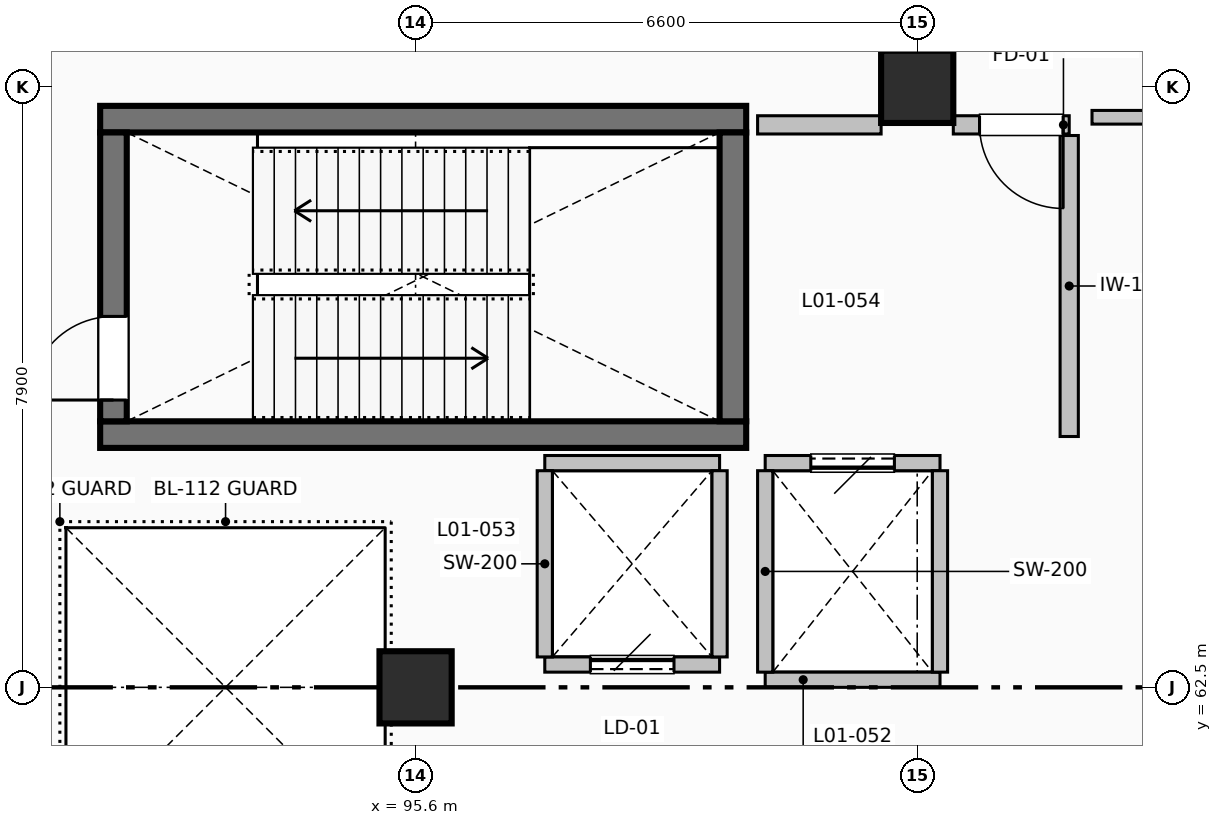
"""IFC4 building model, lengths in metres.
Left out: names, types, materials, properties, quantities, classifications, styles, units other than length and angle.
Written with IfcOpenShell. Run it as: python <this file> out.ifc"""

import sys

from ifc_helpers import new_model, si_unit, direction, frame, frame_2d, origin, origin_2d, place, context, subcontext, project, spatial, rectangle, extrude, element, fill, save


model = new_model("IFC4")
c1 = context("Model", 3, precision=1e-05, world=origin(), true_north=direction((0.0, 1.0)))
c2 = subcontext(c1, "Body", "Model", "MODEL_VIEW")
j1 = project(units=[si_unit("LENGTHUNIT", "METRE"), si_unit("PLANEANGLEUNIT", "RADIAN")], contexts=[c1])
p1 = place(None, origin())
s1 = spatial("IfcSite", under=j1, at=p1, CompositionType="ELEMENT")
p2 = place(p1, origin())
s2 = spatial("IfcBuilding", under=s1, at=p2, CompositionType="ELEMENT")
p3 = place(p2, frame((0.0, 0.0, 5.4)))
s3 = spatial("IfcBuildingStorey", under=s2, at=p3, CompositionType="ELEMENT", Elevation=5.4)
for number, where, z_axis, x_axis in (
    (1, (95.6, 62.5, 0.0), (0.0, 0.0, 1.0), (1.0, 0.0, 0.0)),
    (2, (102.2, 70.4, 0.0), (0.0, 0.0, 1.0), (1.0, 0.0, 0.0)),
):
    element("IfcColumn", number, at=place(p3, frame(where, z_axis=z_axis, x_axis=x_axis)), inside=s3, PredefinedType="COLUMN", context=c2, shape_type="SweptSolid", body=[
        extrude(rectangle(XDim=0.95, YDim=0.95, at=origin_2d()), origin(), (0.0, 0.0, 1.0), 4.8),
    ])
for number, where, z_axis, x_axis in (
    (3, (91.45, 65.825, 0.0), (0.0, 0.0, 1.0), (1.0, 0.0, 0.0)),
    (4, (99.95, 69.975, 0.0), (0.0, 0.0, 1.0), (-1.0, 0.0, 0.0)),
):
    element("IfcWall", number, at=place(p3, frame(where, z_axis=z_axis, x_axis=x_axis)), inside=s3, PredefinedType="SHEAR", context=c2, shape_type="SweptSolid", body=[
        extrude(rectangle(XDim=8.5, YDim=0.35, at=frame_2d((4.25, 0.0))), origin(), (0.0, 0.0, 1.0), 4.48),
    ])
p4 = place(p3, frame((91.625, 66.0, 0.0), z_axis=(0.0, 0.0, 1.0), x_axis=(0.0, 1.0, 0.0)))
e5 = element("IfcWall", 5, at=p4, inside=s3, PredefinedType="SHEAR", context=c2, shape_type="SweptSolid", body=[
    extrude(rectangle(XDim=3.8, YDim=0.35, at=frame_2d((1.9, 0.0))), origin(), (0.0, 0.0, 1.0), 4.48),
])
p5 = place(p4, frame((0.28, 0.0, 0.0)))
e6 = element("IfcOpeningElement", 6, at=p5, cuts=e5, PredefinedType="OPENING", context=c2, shape_type="SweptSolid", body=[
    extrude(rectangle(XDim=1.1, YDim=2.08, at=frame_2d((0.55, 1.04))), frame((0.0, 0.185, 0.0), z_axis=(0.0, -1.0, 0.0), x_axis=(1.0, 0.0, 0.0)), (0.0, 0.0, 1.0), 0.37),
])
p6 = place(p3, frame((99.775, 69.8, 0.0), z_axis=(0.0, 0.0, 1.0), x_axis=(0.0, -1.0, 0.0)))
e7 = element("IfcWall", 7, at=p6, inside=s3, PredefinedType="SHEAR", context=c2, shape_type="SweptSolid", body=[
    extrude(rectangle(XDim=3.8, YDim=0.35, at=frame_2d((1.9, 0.0))), origin(), (0.0, 0.0, 1.0), 4.48),
])
p7 = place(p3, frame((100.2, 62.6, 0.0), z_axis=(0.0, 0.0, 1.0), x_axis=(1.0, 0.0, 0.0)))
e8 = element("IfcWall", 8, at=p7, inside=s3, PredefinedType="PARTITIONING", context=c2, shape_type="SweptSolid", body=[
    extrude(rectangle(XDim=2.3, YDim=0.2, at=frame_2d((1.15, 0.0))), origin(), (0.0, 0.0, 1.0), 4.472),
])
p8 = place(p3, frame((102.5, 65.45, 0.0), z_axis=(0.0, 0.0, 1.0), x_axis=(-1.0, 0.0, 0.0)))
e9 = element("IfcWall", 9, at=p8, inside=s3, PredefinedType="PARTITIONING", context=c2, shape_type="SweptSolid", body=[
    extrude(rectangle(XDim=2.3, YDim=0.2, at=frame_2d((1.15, 0.0))), origin(), (0.0, 0.0, 1.0), 4.472),
])
p9 = place(p8, frame((0.6, 0.0, 0.0)))
e10 = element("IfcOpeningElement", 10, at=p9, cuts=e9, PredefinedType="OPENING", context=c2, shape_type="SweptSolid", body=[
    extrude(rectangle(XDim=1.1, YDim=2.15, at=frame_2d((0.55, 1.075))), frame((0.0, 0.11, 0.0), z_axis=(0.0, -1.0, 0.0), x_axis=(1.0, 0.0, 0.0)), (0.0, 0.0, 1.0), 0.22),
])
for number, where, z_axis, x_axis in (
    (11, (100.2, 62.7, 0.0), (0.0, 0.0, 1.0), (0.0, 1.0, 0.0)),
    (12, (102.5, 65.35, 0.0), (0.0, 0.0, 1.0), (0.0, -1.0, 0.0)),
):
    element("IfcWall", number, at=place(p3, frame(where, z_axis=z_axis, x_axis=x_axis)), inside=s3, PredefinedType="PARTITIONING", context=c2, shape_type="SweptSolid", body=[
        extrude(rectangle(XDim=2.65, YDim=0.2, at=frame_2d((1.325, 0.0))), origin(), (0.0, 0.0, 1.0), 4.472),
    ])
p10 = place(p3, frame((97.3, 62.8, 0.0), z_axis=(0.0, 0.0, 1.0), x_axis=(1.0, 0.0, 0.0)))
e13 = element("IfcWall", 13, at=p10, inside=s3, PredefinedType="PARTITIONING", context=c2, shape_type="SweptSolid", body=[
    extrude(rectangle(XDim=2.3, YDim=0.2, at=frame_2d((1.15, 0.0))), origin(), (0.0, 0.0, 1.0), 4.472),
])
p11 = place(p10, frame((0.6, 0.0, 0.0)))
e14 = element("IfcOpeningElement", 14, at=p11, cuts=e13, PredefinedType="OPENING", context=c2, shape_type="SweptSolid", body=[
    extrude(rectangle(XDim=1.1, YDim=2.15, at=frame_2d((0.55, 1.075))), frame((0.0, 0.11, 0.0), z_axis=(0.0, -1.0, 0.0), x_axis=(1.0, 0.0, 0.0)), (0.0, 0.0, 1.0), 0.22),
])
p12 = place(p3, frame((99.6, 65.45, 0.0), z_axis=(0.0, 0.0, 1.0), x_axis=(-1.0, 0.0, 0.0)))
e15 = element("IfcWall", 15, at=p12, inside=s3, PredefinedType="PARTITIONING", context=c2, shape_type="SweptSolid", body=[
    extrude(rectangle(XDim=2.3, YDim=0.2, at=frame_2d((1.15, 0.0))), origin(), (0.0, 0.0, 1.0), 4.472),
])
for number, where, z_axis, x_axis in (
    (16, (97.3, 62.9, 0.0), (0.0, 0.0, 1.0), (0.0, 1.0, 0.0)),
    (17, (99.6, 65.35, 0.0), (0.0, 0.0, 1.0), (0.0, -1.0, 0.0)),
):
    element("IfcWall", number, at=place(p3, frame(where, z_axis=z_axis, x_axis=x_axis)), inside=s3, PredefinedType="PARTITIONING", context=c2, shape_type="SweptSolid", body=[
        extrude(rectangle(XDim=2.45, YDim=0.2, at=frame_2d((1.225, 0.0))), origin(), (0.0, 0.0, 1.0), 4.472),
    ])
p13 = place(p3, frame((104.2, 69.9, 0.0), z_axis=(0.0, 0.0, 1.0), x_axis=(-1.0, 0.0, 0.0)))
e18 = element("IfcWall", 18, at=p13, inside=s3, PredefinedType="PARTITIONING", context=c2, shape_type="SweptSolid", body=[
    extrude(rectangle(XDim=1.525, YDim=0.24, at=frame_2d((0.762, 0.0))), origin(), (0.0, 0.0, 1.0), 4.472),
])
p14 = place(p13, frame((0.08, 0.0, 0.0)))
e19 = element("IfcOpeningElement", 19, at=p14, cuts=e18, PredefinedType="OPENING", context=c2, shape_type="SweptSolid", body=[
    extrude(rectangle(XDim=1.1, YDim=2.08, at=frame_2d((0.55, 1.04))), frame((0.0, 0.13, 0.0), z_axis=(0.0, -1.0, 0.0), x_axis=(1.0, 0.0, 0.0)), (0.0, 0.0, 1.0), 0.26),
])
p15 = place(p3, frame((101.725, 69.9, 0.0), z_axis=(0.0, 0.0, 1.0), x_axis=(-1.0, 0.0, 0.0)))
e20 = element("IfcWall", 20, at=p15, inside=s3, PredefinedType="PARTITIONING", context=c2, shape_type="SweptSolid", body=[
    extrude(rectangle(XDim=1.625, YDim=0.24, at=frame_2d((0.812, 0.0))), origin(), (0.0, 0.0, 1.0), 4.472),
])
p16 = place(p3, frame((104.2, 69.76, 0.0), z_axis=(0.0, 0.0, 1.0), x_axis=(0.0, -1.0, 0.0)))
e21 = element("IfcWall", 21, at=p16, inside=s3, PredefinedType="PARTITIONING", context=c2, shape_type="SweptSolid", body=[
    extrude(rectangle(XDim=3.96, YDim=0.24, at=frame_2d((1.98, 0.0))), origin(), (0.0, 0.0, 1.0), 4.472),
])
p17 = place(p3, frame((104.5, 70.0, 0.0), z_axis=(0.0, 0.0, 1.0), x_axis=(1.0, 0.0, 0.0)))
e22 = element("IfcWall", 22, at=p17, inside=s3, PredefinedType="PARTITIONING", context=c2, shape_type="SweptSolid", body=[
    extrude(rectangle(XDim=30.225, YDim=0.18, at=frame_2d((15.113, 0.0))), origin(), (0.0, 0.0, 1.0), 4.472),
])
p18 = place(p17, frame((17.25, 0.0, 0.0)))
e23 = element("IfcOpeningElement", 23, at=p18, cuts=e22, PredefinedType="OPENING", context=c2, shape_type="SweptSolid", body=[
    extrude(rectangle(XDim=2.2, YDim=2.32, at=frame_2d((1.1, 1.16))), frame((0.0, 0.1, 0.0), z_axis=(0.0, -1.0, 0.0), x_axis=(1.0, 0.0, 0.0)), (0.0, 0.0, 1.0), 0.2),
])
p19 = place(p5, origin())
e24 = element("IfcDoor", 24, at=p19, inside=s3, OperationType="SINGLE_SWING_LEFT", PredefinedType="DOOR", context=c2, shape_type="SweptSolid", body=[
    extrude(rectangle(XDim=1.1, YDim=2.08, at=frame_2d((0.55, 1.04))), frame((0.0, 0.025, 0.0), z_axis=(0.0, -1.0, 0.0), x_axis=(1.0, 0.0, 0.0)), (0.0, 0.0, 1.0), 0.05),
])
fill(e6, e24)
p20 = place(p9, origin())
e25 = element("IfcDoor", 25, at=p20, inside=s3, OperationType="SLIDING_TO_LEFT", PredefinedType="DOOR", context=c2, shape_type="SweptSolid", body=[
    extrude(rectangle(XDim=1.1, YDim=2.15, at=frame_2d((0.55, 1.075))), frame((0.0, 0.025, 0.0), z_axis=(0.0, -1.0, 0.0), x_axis=(1.0, 0.0, 0.0)), (0.0, 0.0, 1.0), 0.05),
])
fill(e10, e25)
p21 = place(p11, origin())
e26 = element("IfcDoor", 26, at=p21, inside=s3, OperationType="SLIDING_TO_LEFT", PredefinedType="DOOR", context=c2, shape_type="SweptSolid", body=[
    extrude(rectangle(XDim=1.1, YDim=2.15, at=frame_2d((0.55, 1.075))), frame((0.0, 0.025, 0.0), z_axis=(0.0, -1.0, 0.0), x_axis=(1.0, 0.0, 0.0)), (0.0, 0.0, 1.0), 0.05),
])
fill(e14, e26)
p22 = place(p14, origin())
e27 = element("IfcDoor", 27, at=p22, inside=s3, OperationType="SINGLE_SWING_LEFT", PredefinedType="DOOR", context=c2, shape_type="SweptSolid", body=[
    extrude(rectangle(XDim=1.1, YDim=2.08, at=frame_2d((0.55, 1.04))), frame((0.0, 0.025, 0.0), z_axis=(0.0, -1.0, 0.0), x_axis=(1.0, 0.0, 0.0)), (0.0, 0.0, 1.0), 0.05),
])
fill(e19, e27)
save(model, sys.argv[1])
